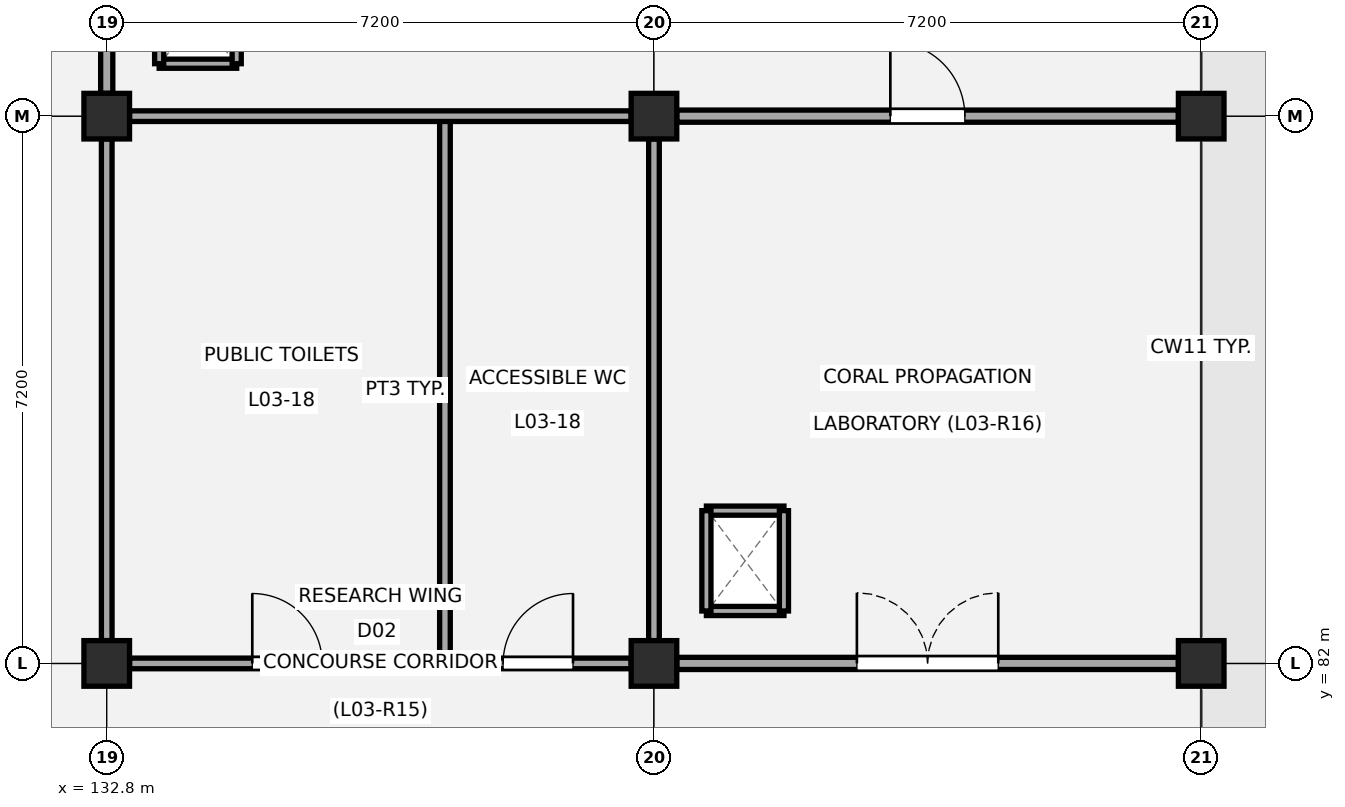
"""IFC4 building model, lengths in metres.
Left out: names, types, materials, properties, quantities, classifications, styles, units other than length and angle.
Written with IfcOpenShell. Run it as: python <this file> out.ifc"""

import sys

from ifc_helpers import new_model, si_unit, direction, frame, frame_2d, origin, origin_2d, place, context, subcontext, project, spatial, rectangle, extrude, element, fill, save


model = new_model("IFC4")
c1 = context("Model", 3, precision=1e-05, world=origin(), true_north=direction((0.0, 1.0)))
c2 = subcontext(c1, "Body", "Model", "MODEL_VIEW")
j1 = project(units=[si_unit("LENGTHUNIT", "METRE"), si_unit("PLANEANGLEUNIT", "RADIAN")], contexts=[c1])
p1 = place(None, origin())
s1 = spatial("IfcSite", under=j1, at=p1, CompositionType="ELEMENT")
p2 = place(p1, origin())
s2 = spatial("IfcBuilding", under=s1, at=p2, CompositionType="ELEMENT")
p3 = place(p2, frame((0.0, 0.0, 13.5)))
s3 = spatial("IfcBuildingStorey", under=s2, at=p3, CompositionType="ELEMENT", Elevation=13.5)
for number, where, z_axis, x_axis in (
    (1, (132.8, 82.0, 0.0), (0.0, 0.0, 1.0), (1.0, 0.0, 0.0)),
    (2, (132.8, 89.2, 0.0), (0.0, 0.0, 1.0), (1.0, 0.0, 0.0)),
    (3, (140.0, 82.0, 0.0), (0.0, 0.0, 1.0), (1.0, 0.0, 0.0)),
    (4, (140.0, 89.2, 0.0), (0.0, 0.0, 1.0), (1.0, 0.0, 0.0)),
    (5, (147.2, 82.0, 0.0), (0.0, 0.0, 1.0), (1.0, 0.0, 0.0)),
    (6, (147.2, 89.2, 0.0), (0.0, 0.0, 1.0), (1.0, 0.0, 0.0)),
):
    element("IfcColumn", number, at=place(p3, frame(where, z_axis=z_axis, x_axis=x_axis)), inside=s3, PredefinedType="COLUMN", context=c2, shape_type="SweptSolid", body=[
        extrude(rectangle(XDim=0.6, YDim=0.6, at=origin_2d()), origin(), (0.0, 0.0, 1.0), 4.14),
    ])
p4 = place(p3, frame((133.49, 89.89, 0.0), z_axis=(0.0, 0.0, 1.0), x_axis=(1.0, 0.0, 0.0)))
e7 = element("IfcWall", 7, at=p4, inside=s3, PredefinedType="PARTITIONING", context=c2, shape_type="SweptSolid", body=[
    extrude(rectangle(XDim=1.02, YDim=0.12, at=frame_2d((0.51, 0.0))), origin(), (0.0, 0.0, 1.0), 3.84),
])
for number, where, z_axis, x_axis in (
    (8, (133.49, 89.89, 0.0), (0.0, 0.0, 1.0), (0.0, 1.0, 0.0)),
    (9, (134.51, 89.89, 0.0), (0.0, 0.0, 1.0), (0.0, 1.0, 0.0)),
):
    element("IfcWall", number, at=place(p3, frame(where, z_axis=z_axis, x_axis=x_axis)), inside=s3, PredefinedType="PARTITIONING", context=c2, shape_type="SweptSolid", body=[
        extrude(rectangle(XDim=1.32, YDim=0.12, at=frame_2d((0.66, 0.0))), origin(), (0.0, 0.0, 1.0), 3.84),
    ])
for number, where, z_axis, x_axis in (
    (10, (140.69, 82.69, 0.0), (0.0, 0.0, 1.0), (1.0, 0.0, 0.0)),
    (11, (140.69, 84.01, 0.0), (0.0, 0.0, 1.0), (1.0, 0.0, 0.0)),
):
    element("IfcWall", number, at=place(p3, frame(where, z_axis=z_axis, x_axis=x_axis)), inside=s3, PredefinedType="PARTITIONING", context=c2, shape_type="SweptSolid", body=[
        extrude(rectangle(XDim=1.02, YDim=0.12, at=frame_2d((0.51, 0.0))), origin(), (0.0, 0.0, 1.0), 3.86),
    ])
for number, where, z_axis, x_axis in (
    (12, (140.69, 82.69, 0.0), (0.0, 0.0, 1.0), (0.0, 1.0, 0.0)),
    (13, (141.71, 82.69, 0.0), (0.0, 0.0, 1.0), (0.0, 1.0, 0.0)),
):
    element("IfcWall", number, at=place(p3, frame(where, z_axis=z_axis, x_axis=x_axis)), inside=s3, PredefinedType="PARTITIONING", context=c2, shape_type="SweptSolid", body=[
        extrude(rectangle(XDim=1.32, YDim=0.12, at=frame_2d((0.66, 0.0))), origin(), (0.0, 0.0, 1.0), 3.86),
    ])
p5 = place(p3, frame((137.25, 82.0, 0.0), z_axis=(0.0, 0.0, 1.0), x_axis=(0.0, 1.0, 0.0)))
e14 = element("IfcWall", 14, at=p5, inside=s3, PredefinedType="PARTITIONING", context=c2, shape_type="SweptSolid", body=[
    extrude(rectangle(XDim=7.2, YDim=0.14, at=frame_2d((3.6, 0.0))), origin(), (0.0, 0.0, 1.0), 3.28),
])
p6 = place(p3, frame((133.1, 82.0, 0.0), z_axis=(0.0, 0.0, 1.0), x_axis=(1.0, 0.0, 0.0)))
e15 = element("IfcWall", 15, at=p6, inside=s3, PredefinedType="PARTITIONING", context=c2, shape_type="SweptSolid", body=[
    extrude(rectangle(XDim=4.15, YDim=0.14, at=frame_2d((2.075, 0.0))), origin(), (0.0, 0.0, 1.0), 3.25),
])
p7 = place(p6, frame((1.615, 0.0, 0.0)))
e16 = element("IfcOpeningElement", 16, at=p7, cuts=e15, PredefinedType="OPENING", context=c2, shape_type="SweptSolid", body=[
    extrude(rectangle(XDim=0.92, YDim=2.08, at=frame_2d((0.46, 1.04))), frame((0.0, 0.08, 0.0), z_axis=(0.0, -1.0, 0.0), x_axis=(1.0, 0.0, 0.0)), (0.0, 0.0, 1.0), 0.16),
])
p8 = place(p3, frame((137.25, 82.0, 0.0), z_axis=(0.0, 0.0, 1.0), x_axis=(1.0, 0.0, 0.0)))
e17 = element("IfcWall", 17, at=p8, inside=s3, PredefinedType="PARTITIONING", context=c2, shape_type="SweptSolid", body=[
    extrude(rectangle(XDim=2.45, YDim=0.14, at=frame_2d((1.225, 0.0))), origin(), (0.0, 0.0, 1.0), 3.25),
])
p9 = place(p8, frame((0.765, 0.0, 0.0)))
e18 = element("IfcOpeningElement", 18, at=p9, cuts=e17, PredefinedType="OPENING", context=c2, shape_type="SweptSolid", body=[
    extrude(rectangle(XDim=0.92, YDim=2.08, at=frame_2d((0.46, 1.04))), frame((0.0, 0.08, 0.0), z_axis=(0.0, -1.0, 0.0), x_axis=(1.0, 0.0, 0.0)), (0.0, 0.0, 1.0), 0.16),
])
p10 = place(p3, frame((133.1, 89.2, 0.0), z_axis=(0.0, 0.0, 1.0), x_axis=(1.0, 0.0, 0.0)))
e19 = element("IfcWall", 19, at=p10, inside=s3, PredefinedType="PARTITIONING", context=c2, shape_type="SweptSolid", body=[
    extrude(rectangle(XDim=6.6, YDim=0.14, at=frame_2d((3.3, 0.0))), origin(), (0.0, 0.0, 1.0), 3.2),
])
for number, where, z_axis, x_axis in (
    (20, (132.8, 82.3, 0.0), (0.0, 0.0, 1.0), (0.0, 1.0, 0.0)),
    (21, (140.0, 82.3, 0.0), (0.0, 0.0, 1.0), (0.0, 1.0, 0.0)),
):
    element("IfcWall", number, at=place(p3, frame(where, z_axis=z_axis, x_axis=x_axis)), inside=s3, PredefinedType="PARTITIONING", context=c2, shape_type="SweptSolid", body=[
        extrude(rectangle(XDim=6.6, YDim=0.14, at=frame_2d((3.3, 0.0))), origin(), (0.0, 0.0, 1.0), 3.25),
    ])
p11 = place(p3, frame((132.8, 89.5, 0.0), z_axis=(0.0, 0.0, 1.0), x_axis=(0.0, 1.0, 0.0)))
e22 = element("IfcWall", 22, at=p11, inside=s3, PredefinedType="PARTITIONING", context=c2, shape_type="SweptSolid", body=[
    extrude(rectangle(XDim=6.6, YDim=0.16, at=frame_2d((3.3, 0.0))), origin(), (0.0, 0.0, 1.0), 3.2),
])
p12 = place(p3, frame((140.3, 82.0, 0.0), z_axis=(0.0, 0.0, 1.0), x_axis=(1.0, 0.0, 0.0)))
e23 = element("IfcWall", 23, at=p12, inside=s3, PredefinedType="PARTITIONING", context=c2, shape_type="SweptSolid", body=[
    extrude(rectangle(XDim=6.6, YDim=0.16, at=frame_2d((3.3, 0.0))), origin(), (0.0, 0.0, 1.0), 3.22),
])
p13 = place(p12, frame((2.37, 0.0, 0.0)))
e24 = element("IfcOpeningElement", 24, at=p13, cuts=e23, PredefinedType="OPENING", context=c2, shape_type="SweptSolid", body=[
    extrude(rectangle(XDim=1.86, YDim=2.26, at=frame_2d((0.93, 1.13))), frame((0.0, 0.09, 0.0), z_axis=(0.0, -1.0, 0.0), x_axis=(1.0, 0.0, 0.0)), (0.0, 0.0, 1.0), 0.18),
])
p14 = place(p3, frame((140.3, 89.2, 0.0), z_axis=(0.0, 0.0, 1.0), x_axis=(1.0, 0.0, 0.0)))
e25 = element("IfcWall", 25, at=p14, inside=s3, PredefinedType="PARTITIONING", context=c2, shape_type="SweptSolid", body=[
    extrude(rectangle(XDim=6.6, YDim=0.16, at=frame_2d((3.3, 0.0))), origin(), (0.0, 0.0, 1.0), 3.27),
])
p15 = place(p14, frame((2.81, 0.0, 0.0)))
e26 = element("IfcOpeningElement", 26, at=p15, cuts=e25, PredefinedType="OPENING", context=c2, shape_type="SweptSolid", body=[
    extrude(rectangle(XDim=0.98, YDim=2.12, at=frame_2d((0.49, 1.06))), frame((0.0, 0.09, 0.0), z_axis=(0.0, -1.0, 0.0), x_axis=(1.0, 0.0, 0.0)), (0.0, 0.0, 1.0), 0.18),
])
p16 = place(p7, origin())
e27 = element("IfcDoor", 27, at=p16, inside=s3, OperationType="SINGLE_SWING_LEFT", PredefinedType="DOOR", context=c2, shape_type="SweptSolid", body=[
    extrude(rectangle(XDim=0.92, YDim=2.08, at=frame_2d((0.46, 1.04))), frame((0.0, 0.025, 0.0), z_axis=(0.0, -1.0, 0.0), x_axis=(1.0, 0.0, 0.0)), (0.0, 0.0, 1.0), 0.05),
])
fill(e16, e27)
p17 = place(p9, origin())
e28 = element("IfcDoor", 28, at=p17, inside=s3, OperationType="SINGLE_SWING_RIGHT", PredefinedType="DOOR", context=c2, shape_type="SweptSolid", body=[
    extrude(rectangle(XDim=0.92, YDim=2.08, at=frame_2d((0.46, 1.04))), frame((0.0, 0.025, 0.0), z_axis=(0.0, -1.0, 0.0), x_axis=(1.0, 0.0, 0.0)), (0.0, 0.0, 1.0), 0.05),
])
fill(e18, e28)
p18 = place(p15, origin())
e29 = element("IfcDoor", 29, at=p18, inside=s3, OperationType="SINGLE_SWING_LEFT", PredefinedType="DOOR", context=c2, shape_type="SweptSolid", body=[
    extrude(rectangle(XDim=0.98, YDim=2.12, at=frame_2d((0.49, 1.06))), frame((0.0, 0.025, 0.0), z_axis=(0.0, -1.0, 0.0), x_axis=(1.0, 0.0, 0.0)), (0.0, 0.0, 1.0), 0.05),
])
fill(e26, e29)
p19 = place(p13, origin())
e30 = element("IfcDoor", 30, at=p19, inside=s3, OperationType="DOUBLE_DOOR_SINGLE_SWING", PredefinedType="DOOR", context=c2, shape_type="SweptSolid", body=[
    extrude(rectangle(XDim=1.86, YDim=2.26, at=frame_2d((0.93, 1.13))), frame((0.0, 0.025, 0.0), z_axis=(0.0, -1.0, 0.0), x_axis=(1.0, 0.0, 0.0)), (0.0, 0.0, 1.0), 0.05),
])
fill(e24, e30)
save(model, sys.argv[1])
